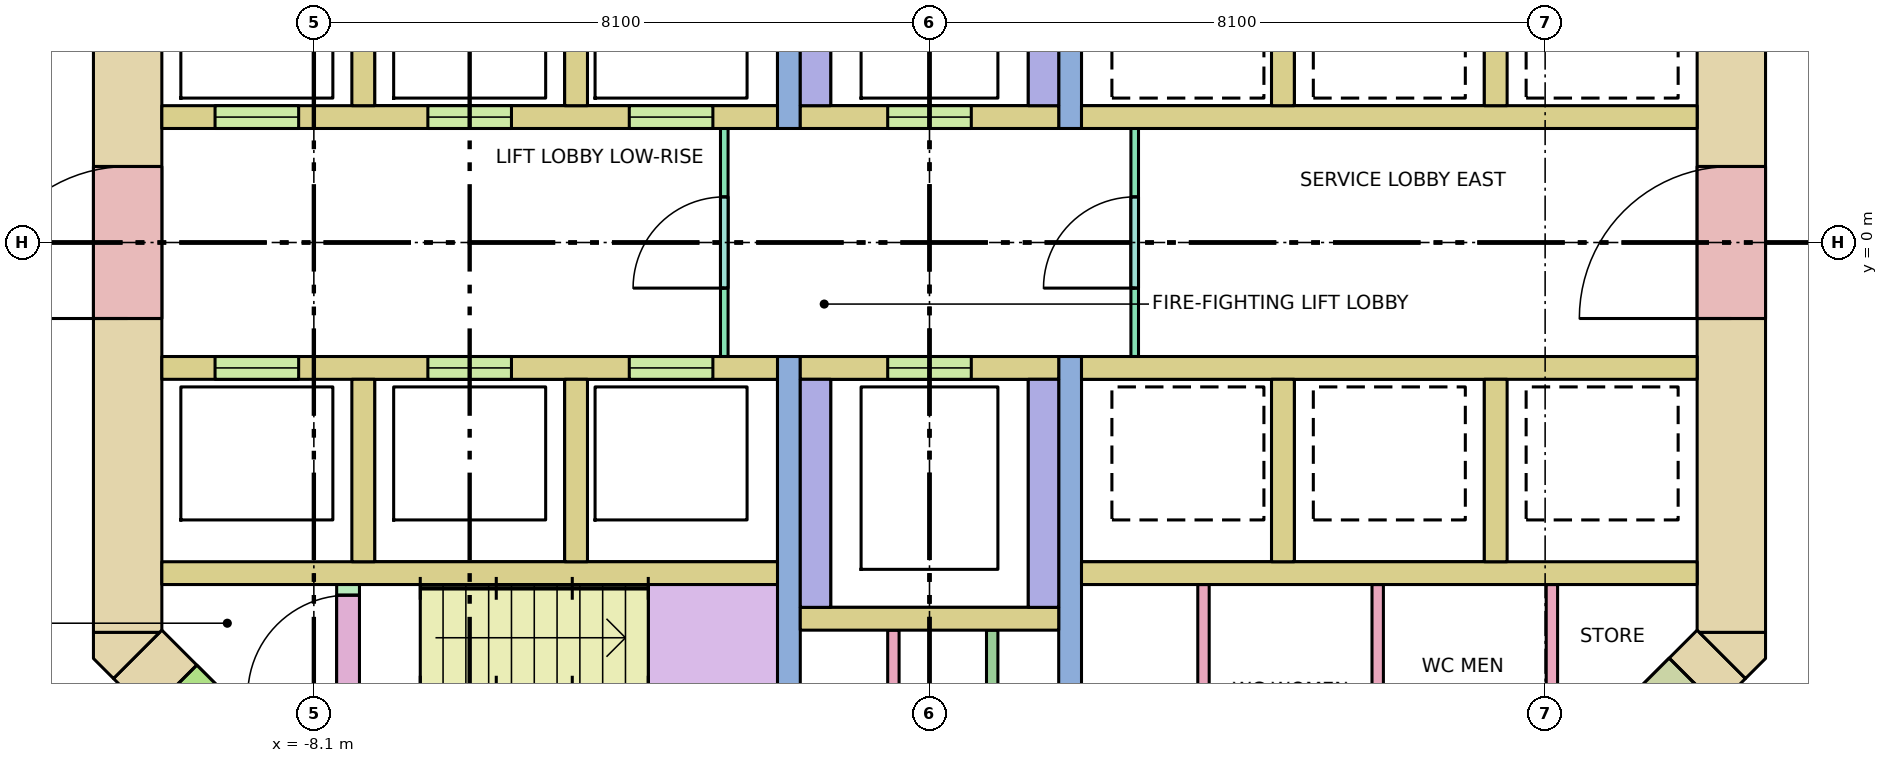
"""IFC4 building model, lengths in metres.
Left out: names, types, materials, properties, quantities, classifications, styles, units other than length and angle.
Written with IfcOpenShell. Run it as: python <this file> out.ifc"""

import sys

from ifc_helpers import new_model, si_unit, direction, frame, frame_2d, origin, place, context, subcontext, project, spatial, polyline, rectangle, outline, extrude, element, fill, save


model = new_model("IFC4")
c1 = context("Model", 3, precision=1e-05, world=origin(), true_north=direction((0.0, 1.0)))
c2 = subcontext(c1, "Body", "Model", "MODEL_VIEW")
j1 = project(units=[si_unit("LENGTHUNIT", "METRE"), si_unit("PLANEANGLEUNIT", "RADIAN")], contexts=[c1])
p1 = place(None, origin())
s1 = spatial("IfcSite", under=j1, at=p1, CompositionType="ELEMENT")
p2 = place(p1, origin())
s2 = spatial("IfcBuilding", under=s1, at=p2, CompositionType="ELEMENT")
p3 = place(p2, frame((0.0, 0.0, 142.8)))
s3 = spatial("IfcBuildingStorey", under=s2, at=p3, CompositionType="ELEMENT", Elevation=142.8)
p4 = place(p3, frame((-10.55, -5.13, -0.28), z_axis=(0.0, 0.0, 1.0), x_axis=(0.0, 1.0, 0.0)))
e1 = element("IfcWall", 1, at=p4, inside=s3, PredefinedType="SHEAR", context=c2, shape_type="SweptSolid", body=[
    extrude(rectangle(XDim=10.26, YDim=0.9, at=frame_2d((5.13, 0.0))), origin(), (0.0, 0.0, 1.0), 3.8),
])
p5 = place(p4, frame((4.13, 0.0, 0.28)))
e2 = element("IfcOpeningElement", 2, at=p5, cuts=e1, PredefinedType="OPENING", context=c2, shape_type="SweptSolid", body=[
    extrude(rectangle(XDim=2.0, YDim=2.1, at=frame_2d((1.0, 1.05))), frame((0.0, 0.46, 0.0), z_axis=(0.0, -1.0, 0.0), x_axis=(1.0, 0.0, 0.0)), (0.0, 0.0, 1.0), 0.92),
])
p6 = place(p3, frame((10.55, -5.13, -0.28), z_axis=(0.0, 0.0, 1.0), x_axis=(0.0, 1.0, 0.0)))
e3 = element("IfcWall", 3, at=p6, inside=s3, PredefinedType="SHEAR", context=c2, shape_type="SweptSolid", body=[
    extrude(rectangle(XDim=10.26, YDim=0.9, at=frame_2d((5.13, 0.0))), origin(), (0.0, 0.0, 1.0), 3.8),
])
p7 = place(p6, frame((4.13, 0.0, 0.28)))
e4 = element("IfcOpeningElement", 4, at=p7, cuts=e3, PredefinedType="OPENING", context=c2, shape_type="SweptSolid", body=[
    extrude(rectangle(XDim=2.0, YDim=2.1, at=frame_2d((1.0, 1.05))), frame((0.0, 0.46, 0.0), z_axis=(0.0, -1.0, 0.0), x_axis=(1.0, 0.0, 0.0)), (0.0, 0.0, 1.0), 0.92),
])
p8 = place(p3, frame((10.418, -5.418, -0.28), z_axis=(0.0, 0.0, 1.0), x_axis=(-0.707106781187, -0.707106781187, 0.0)))
e5 = element("IfcWall", 5, at=p8, inside=s3, PredefinedType="SHEAR", context=c2, shape_type="SweptSolid", body=[
    extrude(rectangle(XDim=4.243, YDim=0.9, at=frame_2d((2.121, 0.0))), origin(), (0.0, 0.0, 1.0), 3.8),
])
p9 = place(p8, frame((2.823, 0.0, 0.28)))
e6 = element("IfcOpeningElement", 6, at=p9, cuts=e5, PredefinedType="OPENING", context=c2, shape_type="SweptSolid", body=[
    extrude(rectangle(XDim=0.9, YDim=2.1, at=frame_2d((0.45, 1.05))), frame((0.0, 0.46, 0.0), z_axis=(0.0, -1.0, 0.0), x_axis=(1.0, 0.0, 0.0)), (0.0, 0.0, 1.0), 0.92),
])
p10 = place(p8, frame((0.52, 0.0, 0.28)))
e7 = element("IfcOpeningElement", 7, at=p10, cuts=e5, PredefinedType="OPENING", context=c2, shape_type="SweptSolid", body=[
    extrude(rectangle(XDim=0.9, YDim=2.1, at=frame_2d((0.45, 1.05))), frame((0.0, 0.46, 0.0), z_axis=(0.0, -1.0, 0.0), x_axis=(1.0, 0.0, 0.0)), (0.0, 0.0, 1.0), 0.92),
])
p11 = place(p3, frame((-7.418, -8.418, -0.28), z_axis=(0.0, 0.0, 1.0), x_axis=(-0.707106781187, 0.707106781187, 0.0)))
e8 = element("IfcWall", 8, at=p11, inside=s3, PredefinedType="SHEAR", context=c2, shape_type="SweptSolid", body=[
    extrude(rectangle(XDim=4.243, YDim=0.9, at=frame_2d((2.121, 0.0))), origin(), (0.0, 0.0, 1.0), 3.8),
])
p12 = place(p11, frame((2.393, 0.0, 0.28)))
e9 = element("IfcOpeningElement", 9, at=p12, cuts=e8, PredefinedType="OPENING", context=c2, shape_type="SweptSolid", body=[
    extrude(rectangle(XDim=1.2, YDim=2.1, at=frame_2d((0.6, 1.05))), frame((0.0, 0.46, 0.0), z_axis=(0.0, -1.0, 0.0), x_axis=(1.0, 0.0, 0.0)), (0.0, 0.0, 1.0), 0.92),
])
p13 = place(p3, frame((0.0, 0.0, -0.28)))
e10 = element("IfcWall", 10, at=p13, inside=s3, PredefinedType="SHEAR", context=c2, shape_type="SweptSolid", body=[
    extrude(outline(polyline([(-11.0, -5.473), (-11.0, -5.13), (-10.13, -5.13), (-10.736, -5.736), (-11.0, -5.473)])), origin(), (0.0, 0.0, 1.0), 3.8),
])
p14 = place(p3, frame((0.0, 0.0, -0.28)))
e11 = element("IfcWall", 11, at=p14, inside=s3, PredefinedType="SHEAR", context=c2, shape_type="SweptSolid", body=[
    extrude(outline(polyline([(11.0, -5.473), (10.736, -5.736), (10.13, -5.13), (11.0, -5.13), (11.0, -5.473)])), origin(), (0.0, 0.0, 1.0), 3.8),
])
for number, where, z_axis, x_axis in (
    (12, (-10.1, -4.35, 0.0), (0.0, 0.0, 1.0), (1.0, 0.0, 0.0)),
    (13, (2.0, -4.35, 0.0), (0.0, 0.0, 1.0), (1.0, 0.0, 0.0)),
):
    element("IfcWall", number, at=place(p3, frame(where, z_axis=z_axis, x_axis=x_axis)), inside=s3, PredefinedType="SOLIDWALL", context=c2, shape_type="SweptSolid", body=[
        extrude(rectangle(XDim=8.1, YDim=0.3, at=frame_2d((4.05, 0.0))), origin(), (0.0, 0.0, 1.0), 3.52),
    ])
p15 = place(p3, frame((-10.1, 1.65, 0.0), z_axis=(0.0, 0.0, 1.0), x_axis=(1.0, 0.0, 0.0)))
e14 = element("IfcWall", 14, at=p15, inside=s3, PredefinedType="SOLIDWALL", context=c2, shape_type="SweptSolid", body=[
    extrude(rectangle(XDim=8.1, YDim=0.3, at=frame_2d((4.05, 0.0))), origin(), (0.0, 0.0, 1.0), 3.52),
])
p16 = place(p15, frame((0.7, 0.0, 0.0)))
e15 = element("IfcOpeningElement", 15, at=p16, cuts=e14, PredefinedType="OPENING", context=c2, shape_type="SweptSolid", body=[
    extrude(rectangle(XDim=1.1, YDim=2.1, at=frame_2d((0.55, 1.05))), frame((0.0, 0.16, 0.0), z_axis=(0.0, -1.0, 0.0), x_axis=(1.0, 0.0, 0.0)), (0.0, 0.0, 1.0), 0.32),
])
p17 = place(p15, frame((3.5, 0.0, 0.0)))
e16 = element("IfcOpeningElement", 16, at=p17, cuts=e14, PredefinedType="OPENING", context=c2, shape_type="SweptSolid", body=[
    extrude(rectangle(XDim=1.1, YDim=2.1, at=frame_2d((0.55, 1.05))), frame((0.0, 0.16, 0.0), z_axis=(0.0, -1.0, 0.0), x_axis=(1.0, 0.0, 0.0)), (0.0, 0.0, 1.0), 0.32),
])
p18 = place(p15, frame((6.15, 0.0, 0.0)))
e17 = element("IfcOpeningElement", 17, at=p18, cuts=e14, PredefinedType="OPENING", context=c2, shape_type="SweptSolid", body=[
    extrude(rectangle(XDim=1.1, YDim=2.1, at=frame_2d((0.55, 1.05))), frame((0.0, 0.16, 0.0), z_axis=(0.0, -1.0, 0.0), x_axis=(1.0, 0.0, 0.0)), (0.0, 0.0, 1.0), 0.32),
])
p19 = place(p3, frame((-10.1, -1.65, 0.0), z_axis=(0.0, 0.0, 1.0), x_axis=(1.0, 0.0, 0.0)))
e18 = element("IfcWall", 18, at=p19, inside=s3, PredefinedType="SOLIDWALL", context=c2, shape_type="SweptSolid", body=[
    extrude(rectangle(XDim=8.1, YDim=0.3, at=frame_2d((4.05, 0.0))), origin(), (0.0, 0.0, 1.0), 3.52),
])
p20 = place(p19, frame((0.7, 0.0, 0.0)))
e19 = element("IfcOpeningElement", 19, at=p20, cuts=e18, PredefinedType="OPENING", context=c2, shape_type="SweptSolid", body=[
    extrude(rectangle(XDim=1.1, YDim=2.1, at=frame_2d((0.55, 1.05))), frame((0.0, 0.16, 0.0), z_axis=(0.0, -1.0, 0.0), x_axis=(1.0, 0.0, 0.0)), (0.0, 0.0, 1.0), 0.32),
])
p21 = place(p19, frame((3.5, 0.0, 0.0)))
e20 = element("IfcOpeningElement", 20, at=p21, cuts=e18, PredefinedType="OPENING", context=c2, shape_type="SweptSolid", body=[
    extrude(rectangle(XDim=1.1, YDim=2.1, at=frame_2d((0.55, 1.05))), frame((0.0, 0.16, 0.0), z_axis=(0.0, -1.0, 0.0), x_axis=(1.0, 0.0, 0.0)), (0.0, 0.0, 1.0), 0.32),
])
p22 = place(p19, frame((6.15, 0.0, 0.0)))
e21 = element("IfcOpeningElement", 21, at=p22, cuts=e18, PredefinedType="OPENING", context=c2, shape_type="SweptSolid", body=[
    extrude(rectangle(XDim=1.1, YDim=2.1, at=frame_2d((0.55, 1.05))), frame((0.0, 0.16, 0.0), z_axis=(0.0, -1.0, 0.0), x_axis=(1.0, 0.0, 0.0)), (0.0, 0.0, 1.0), 0.32),
])
for number, where, z_axis, x_axis in (
    (22, (2.0, 1.65, 0.0), (0.0, 0.0, 1.0), (1.0, 0.0, 0.0)),
    (23, (2.0, -1.65, 0.0), (0.0, 0.0, 1.0), (1.0, 0.0, 0.0)),
):
    element("IfcWall", number, at=place(p3, frame(where, z_axis=z_axis, x_axis=x_axis)), inside=s3, PredefinedType="SOLIDWALL", context=c2, shape_type="SweptSolid", body=[
        extrude(rectangle(XDim=8.1, YDim=0.3, at=frame_2d((4.05, 0.0))), origin(), (0.0, 0.0, 1.0), 3.52),
    ])
for number, where, z_axis, x_axis in (
    (24, (-7.45, 1.8, 0.0), (0.0, 0.0, 1.0), (0.0, 1.0, 0.0)),
    (25, (-7.45, -4.2, 0.0), (0.0, 0.0, 1.0), (0.0, 1.0, 0.0)),
    (26, (-4.65, 1.8, 0.0), (0.0, 0.0, 1.0), (0.0, 1.0, 0.0)),
    (27, (-4.65, -4.2, 0.0), (0.0, 0.0, 1.0), (0.0, 1.0, 0.0)),
    (28, (4.65, 1.8, 0.0), (0.0, 0.0, 1.0), (0.0, 1.0, 0.0)),
    (29, (4.65, -4.2, 0.0), (0.0, 0.0, 1.0), (0.0, 1.0, 0.0)),
    (30, (7.45, 1.8, 0.0), (0.0, 0.0, 1.0), (0.0, 1.0, 0.0)),
    (31, (7.45, -4.2, 0.0), (0.0, 0.0, 1.0), (0.0, 1.0, 0.0)),
):
    element("IfcWall", number, at=place(p3, frame(where, z_axis=z_axis, x_axis=x_axis)), inside=s3, PredefinedType="SOLIDWALL", context=c2, shape_type="SweptSolid", body=[
        extrude(rectangle(XDim=2.4, YDim=0.3, at=frame_2d((1.2, 0.0))), origin(), (0.0, 0.0, 1.0), 3.52),
    ])
for number, where, z_axis, x_axis in (
    (32, (-1.85, 1.5, 0.0), (0.0, 0.0, 1.0), (0.0, 1.0, 0.0)),
    (33, (-1.85, -8.1, 0.0), (0.0, 0.0, 1.0), (0.0, 1.0, 0.0)),
    (34, (1.85, 1.5, 0.0), (0.0, 0.0, 1.0), (0.0, 1.0, 0.0)),
    (35, (1.85, -8.1, 0.0), (0.0, 0.0, 1.0), (0.0, 1.0, 0.0)),
):
    element("IfcWall", number, at=place(p3, frame(where, z_axis=z_axis, x_axis=x_axis)), inside=s3, PredefinedType="SHEAR", context=c2, shape_type="SweptSolid", body=[
        extrude(rectangle(XDim=6.6, YDim=0.3, at=frame_2d((3.3, 0.0))), origin(), (0.0, 0.0, 1.0), 3.52),
    ])
p23 = place(p3, frame((-1.7, 1.65, 0.0), z_axis=(0.0, 0.0, 1.0), x_axis=(1.0, 0.0, 0.0)))
e36 = element("IfcWall", 36, at=p23, inside=s3, PredefinedType="SOLIDWALL", context=c2, shape_type="SweptSolid", body=[
    extrude(rectangle(XDim=3.4, YDim=0.3, at=frame_2d((1.7, 0.0))), origin(), (0.0, 0.0, 1.0), 3.52),
])
p24 = place(p23, frame((1.15, 0.0, 0.0)))
e37 = element("IfcOpeningElement", 37, at=p24, cuts=e36, PredefinedType="OPENING", context=c2, shape_type="SweptSolid", body=[
    extrude(rectangle(XDim=1.1, YDim=2.1, at=frame_2d((0.55, 1.05))), frame((0.0, 0.16, 0.0), z_axis=(0.0, -1.0, 0.0), x_axis=(1.0, 0.0, 0.0)), (0.0, 0.0, 1.0), 0.32),
])
p25 = place(p3, frame((-1.7, -1.65, 0.0), z_axis=(0.0, 0.0, 1.0), x_axis=(1.0, 0.0, 0.0)))
e38 = element("IfcWall", 38, at=p25, inside=s3, PredefinedType="SOLIDWALL", context=c2, shape_type="SweptSolid", body=[
    extrude(rectangle(XDim=3.4, YDim=0.3, at=frame_2d((1.7, 0.0))), origin(), (0.0, 0.0, 1.0), 3.52),
])
p26 = place(p25, frame((1.15, 0.0, 0.0)))
e39 = element("IfcOpeningElement", 39, at=p26, cuts=e38, PredefinedType="OPENING", context=c2, shape_type="SweptSolid", body=[
    extrude(rectangle(XDim=1.1, YDim=2.1, at=frame_2d((0.55, 1.05))), frame((0.0, 0.16, 0.0), z_axis=(0.0, -1.0, 0.0), x_axis=(1.0, 0.0, 0.0)), (0.0, 0.0, 1.0), 0.32),
])
for number, where, z_axis, x_axis in (
    (40, (-1.5, 1.8, 0.0), (0.0, 0.0, 1.0), (0.0, 1.0, 0.0)),
    (41, (-1.5, -4.8, 0.0), (0.0, 0.0, 1.0), (0.0, 1.0, 0.0)),
    (42, (1.5, 1.8, 0.0), (0.0, 0.0, 1.0), (0.0, 1.0, 0.0)),
    (43, (1.5, -4.8, 0.0), (0.0, 0.0, 1.0), (0.0, 1.0, 0.0)),
):
    element("IfcWall", number, at=place(p3, frame(where, z_axis=z_axis, x_axis=x_axis)), inside=s3, PredefinedType="SOLIDWALL", context=c2, shape_type="SweptSolid", body=[
        extrude(rectangle(XDim=3.0, YDim=0.4, at=frame_2d((1.5, 0.0))), origin(), (0.0, 0.0, 1.0), 3.52),
    ])
p27 = place(p3, frame((-1.7, -4.95, 0.0), z_axis=(0.0, 0.0, 1.0), x_axis=(1.0, 0.0, 0.0)))
e44 = element("IfcWall", 44, at=p27, inside=s3, PredefinedType="SOLIDWALL", context=c2, shape_type="SweptSolid", body=[
    extrude(rectangle(XDim=3.4, YDim=0.3, at=frame_2d((1.7, 0.0))), origin(), (0.0, 0.0, 1.0), 3.52),
])
p28 = place(p3, frame((-7.65, -7.64, 0.0), z_axis=(0.0, 0.0, 1.0), x_axis=(0.0, 1.0, 0.0)))
e45 = element("IfcWall", 45, at=p28, inside=s3, PredefinedType="SHEAR", context=c2, shape_type="SweptSolid", body=[
    extrude(rectangle(XDim=3.14, YDim=0.3, at=frame_2d((1.57, 0.0))), origin(), (0.0, 0.0, 1.0), 3.52),
])
p29 = place(p28, frame((1.68, 0.0, 0.0)))
e46 = element("IfcOpeningElement", 46, at=p29, cuts=e45, PredefinedType="OPENING", context=c2, shape_type="SweptSolid", body=[
    extrude(rectangle(XDim=1.32, YDim=2.1, at=frame_2d((0.66, 1.05))), frame((0.0, 0.16, 0.0), z_axis=(0.0, -1.0, 0.0), x_axis=(1.0, 0.0, 0.0)), (0.0, 0.0, 1.0), 0.32),
])
p30 = place(p3, frame((-2.7, -1.5, 0.0), z_axis=(0.0, 0.0, 1.0), x_axis=(0.0, 1.0, 0.0)))
e47 = element("IfcWall", 47, at=p30, inside=s3, PredefinedType="PARTITIONING", context=c2, shape_type="SweptSolid", body=[
    extrude(rectangle(XDim=3.0, YDim=0.1, at=frame_2d((1.5, 0.0))), origin(), (0.0, 0.0, 1.0), 3.52),
])
p31 = place(p30, frame((0.9, 0.0, 0.0)))
e48 = element("IfcOpeningElement", 48, at=p31, cuts=e47, PredefinedType="OPENING", context=c2, shape_type="SweptSolid", body=[
    extrude(rectangle(XDim=1.2, YDim=2.1, at=frame_2d((0.6, 1.05))), frame((0.0, 0.06, 0.0), z_axis=(0.0, -1.0, 0.0), x_axis=(1.0, 0.0, 0.0)), (0.0, 0.0, 1.0), 0.12),
])
p32 = place(p3, frame((2.7, -1.5, 0.0), z_axis=(0.0, 0.0, 1.0), x_axis=(0.0, 1.0, 0.0)))
e49 = element("IfcWall", 49, at=p32, inside=s3, PredefinedType="PARTITIONING", context=c2, shape_type="SweptSolid", body=[
    extrude(rectangle(XDim=3.0, YDim=0.1, at=frame_2d((1.5, 0.0))), origin(), (0.0, 0.0, 1.0), 3.52),
])
p33 = place(p32, frame((0.9, 0.0, 0.0)))
e50 = element("IfcOpeningElement", 50, at=p33, cuts=e49, PredefinedType="OPENING", context=c2, shape_type="SweptSolid", body=[
    extrude(rectangle(XDim=1.2, YDim=2.1, at=frame_2d((0.6, 1.05))), frame((0.0, 0.06, 0.0), z_axis=(0.0, -1.0, 0.0), x_axis=(1.0, 0.0, 0.0)), (0.0, 0.0, 1.0), 0.12),
])
for number, where, z_axis, x_axis in (
    (51, (0.825, -8.1, 0.0), (0.0, 0.0, 1.0), (0.0, 1.0, 0.0)),
    (52, (-0.475, -8.1, 0.0), (0.0, 0.0, 1.0), (0.0, 1.0, 0.0)),
):
    element("IfcWall", number, at=place(p3, frame(where, z_axis=z_axis, x_axis=x_axis)), inside=s3, PredefinedType="PARTITIONING", context=c2, shape_type="SweptSolid", body=[
        extrude(rectangle(XDim=3.0, YDim=0.15, at=frame_2d((1.5, 0.0))), origin(), (0.0, 0.0, 1.0), 3.52),
    ])
for number, where, z_axis, x_axis in (
    (53, (3.605, -8.1, 0.0), (0.0, 0.0, 1.0), (0.0, 1.0, 0.0)),
    (54, (5.897, -8.1, 0.0), (0.0, 0.0, 1.0), (0.0, 1.0, 0.0)),
):
    element("IfcWall", number, at=place(p3, frame(where, z_axis=z_axis, x_axis=x_axis)), inside=s3, PredefinedType="PARTITIONING", context=c2, shape_type="SweptSolid", body=[
        extrude(rectangle(XDim=3.6, YDim=0.15, at=frame_2d((1.8, 0.0))), origin(), (0.0, 0.0, 1.0), 3.52),
    ])
p34 = place(p3, frame((8.189, -6.936, 0.0), z_axis=(0.0, 0.0, 1.0), x_axis=(0.0, 1.0, 0.0)))
e55 = element("IfcWall", 55, at=p34, inside=s3, PredefinedType="PARTITIONING", context=c2, shape_type="SweptSolid", body=[
    extrude(rectangle(XDim=2.436, YDim=0.15, at=frame_2d((1.218, 0.0))), origin(), (0.0, 0.0, 1.0), 3.52),
])
p35 = place(p16, origin())
e56 = element("IfcDoor", 56, at=p35, inside=s3, OperationType="DOUBLE_DOOR_SLIDING", PredefinedType="DOOR", context=c2, shape_type="SweptSolid", body=[
    extrude(rectangle(XDim=1.1, YDim=2.1, at=frame_2d((0.55, 1.05))), frame((0.0, 0.025, 0.0), z_axis=(0.0, -1.0, 0.0), x_axis=(1.0, 0.0, 0.0)), (0.0, 0.0, 1.0), 0.05),
])
fill(e15, e56)
p36 = place(p17, origin())
e57 = element("IfcDoor", 57, at=p36, inside=s3, OperationType="DOUBLE_DOOR_SLIDING", PredefinedType="DOOR", context=c2, shape_type="SweptSolid", body=[
    extrude(rectangle(XDim=1.1, YDim=2.1, at=frame_2d((0.55, 1.05))), frame((0.0, 0.025, 0.0), z_axis=(0.0, -1.0, 0.0), x_axis=(1.0, 0.0, 0.0)), (0.0, 0.0, 1.0), 0.05),
])
fill(e16, e57)
p37 = place(p18, origin())
e58 = element("IfcDoor", 58, at=p37, inside=s3, OperationType="DOUBLE_DOOR_SLIDING", PredefinedType="DOOR", context=c2, shape_type="SweptSolid", body=[
    extrude(rectangle(XDim=1.1, YDim=2.1, at=frame_2d((0.55, 1.05))), frame((0.0, 0.025, 0.0), z_axis=(0.0, -1.0, 0.0), x_axis=(1.0, 0.0, 0.0)), (0.0, 0.0, 1.0), 0.05),
])
fill(e17, e58)
p38 = place(p20, origin())
e59 = element("IfcDoor", 59, at=p38, inside=s3, OperationType="DOUBLE_DOOR_SLIDING", PredefinedType="DOOR", context=c2, shape_type="SweptSolid", body=[
    extrude(rectangle(XDim=1.1, YDim=2.1, at=frame_2d((0.55, 1.05))), frame((0.0, 0.025, 0.0), z_axis=(0.0, -1.0, 0.0), x_axis=(1.0, 0.0, 0.0)), (0.0, 0.0, 1.0), 0.05),
])
fill(e19, e59)
p39 = place(p21, origin())
e60 = element("IfcDoor", 60, at=p39, inside=s3, OperationType="DOUBLE_DOOR_SLIDING", PredefinedType="DOOR", context=c2, shape_type="SweptSolid", body=[
    extrude(rectangle(XDim=1.1, YDim=2.1, at=frame_2d((0.55, 1.05))), frame((0.0, 0.025, 0.0), z_axis=(0.0, -1.0, 0.0), x_axis=(1.0, 0.0, 0.0)), (0.0, 0.0, 1.0), 0.05),
])
fill(e20, e60)
p40 = place(p22, origin())
e61 = element("IfcDoor", 61, at=p40, inside=s3, OperationType="DOUBLE_DOOR_SLIDING", PredefinedType="DOOR", context=c2, shape_type="SweptSolid", body=[
    extrude(rectangle(XDim=1.1, YDim=2.1, at=frame_2d((0.55, 1.05))), frame((0.0, 0.025, 0.0), z_axis=(0.0, -1.0, 0.0), x_axis=(1.0, 0.0, 0.0)), (0.0, 0.0, 1.0), 0.05),
])
fill(e21, e61)
p41 = place(p24, origin())
e62 = element("IfcDoor", 62, at=p41, inside=s3, OperationType="DOUBLE_DOOR_SLIDING", PredefinedType="DOOR", context=c2, shape_type="SweptSolid", body=[
    extrude(rectangle(XDim=1.1, YDim=2.1, at=frame_2d((0.55, 1.05))), frame((0.0, 0.025, 0.0), z_axis=(0.0, -1.0, 0.0), x_axis=(1.0, 0.0, 0.0)), (0.0, 0.0, 1.0), 0.05),
])
fill(e37, e62)
p42 = place(p26, origin())
e63 = element("IfcDoor", 63, at=p42, inside=s3, OperationType="DOUBLE_DOOR_SLIDING", PredefinedType="DOOR", context=c2, shape_type="SweptSolid", body=[
    extrude(rectangle(XDim=1.1, YDim=2.1, at=frame_2d((0.55, 1.05))), frame((0.0, 0.025, 0.0), z_axis=(0.0, -1.0, 0.0), x_axis=(1.0, 0.0, 0.0)), (0.0, 0.0, 1.0), 0.05),
])
fill(e39, e63)
p43 = place(p29, origin())
e64 = element("IfcDoor", 64, at=p43, inside=s3, OperationType="DOUBLE_DOOR_SINGLE_SWING", PredefinedType="DOOR", context=c2, shape_type="SweptSolid", body=[
    extrude(rectangle(XDim=1.32, YDim=2.1, at=frame_2d((0.66, 1.05))), frame((0.0, 0.025, 0.0), z_axis=(0.0, -1.0, 0.0), x_axis=(1.0, 0.0, 0.0)), (0.0, 0.0, 1.0), 0.05),
])
fill(e46, e64)
p44 = place(p5, origin())
e65 = element("IfcDoor", 65, at=p44, inside=s3, OperationType="DOUBLE_DOOR_SINGLE_SWING", PredefinedType="DOOR", context=c2, shape_type="SweptSolid", body=[
    extrude(rectangle(XDim=2.0, YDim=2.1, at=frame_2d((1.0, 1.05))), frame((0.0, 0.025, 0.0), z_axis=(0.0, -1.0, 0.0), x_axis=(1.0, 0.0, 0.0)), (0.0, 0.0, 1.0), 0.05),
])
fill(e2, e65)
p45 = place(p7, origin())
e66 = element("IfcDoor", 66, at=p45, inside=s3, OperationType="DOUBLE_DOOR_SINGLE_SWING", PredefinedType="DOOR", context=c2, shape_type="SweptSolid", body=[
    extrude(rectangle(XDim=2.0, YDim=2.1, at=frame_2d((1.0, 1.05))), frame((0.0, 0.025, 0.0), z_axis=(0.0, -1.0, 0.0), x_axis=(1.0, 0.0, 0.0)), (0.0, 0.0, 1.0), 0.05),
])
fill(e4, e66)
p46 = place(p31, origin())
e67 = element("IfcDoor", 67, at=p46, inside=s3, OperationType="SINGLE_SWING_LEFT", PredefinedType="DOOR", context=c2, shape_type="SweptSolid", body=[
    extrude(rectangle(XDim=1.2, YDim=2.1, at=frame_2d((0.6, 1.05))), frame((0.0, 0.025, 0.0), z_axis=(0.0, -1.0, 0.0), x_axis=(1.0, 0.0, 0.0)), (0.0, 0.0, 1.0), 0.05),
])
fill(e48, e67)
p47 = place(p33, origin())
e68 = element("IfcDoor", 68, at=p47, inside=s3, OperationType="SINGLE_SWING_LEFT", PredefinedType="DOOR", context=c2, shape_type="SweptSolid", body=[
    extrude(rectangle(XDim=1.2, YDim=2.1, at=frame_2d((0.6, 1.05))), frame((0.0, 0.025, 0.0), z_axis=(0.0, -1.0, 0.0), x_axis=(1.0, 0.0, 0.0)), (0.0, 0.0, 1.0), 0.05),
])
fill(e50, e68)
p48 = place(p10, origin())
e69 = element("IfcDoor", 69, at=p48, inside=s3, OperationType="SINGLE_SWING_LEFT", PredefinedType="DOOR", context=c2, shape_type="SweptSolid", body=[
    extrude(rectangle(XDim=0.9, YDim=2.1, at=frame_2d((0.45, 1.05))), frame((0.0, 0.025, 0.0), z_axis=(0.0, -1.0, 0.0), x_axis=(1.0, 0.0, 0.0)), (0.0, 0.0, 1.0), 0.05),
])
fill(e7, e69)
save(model, sys.argv[1])
